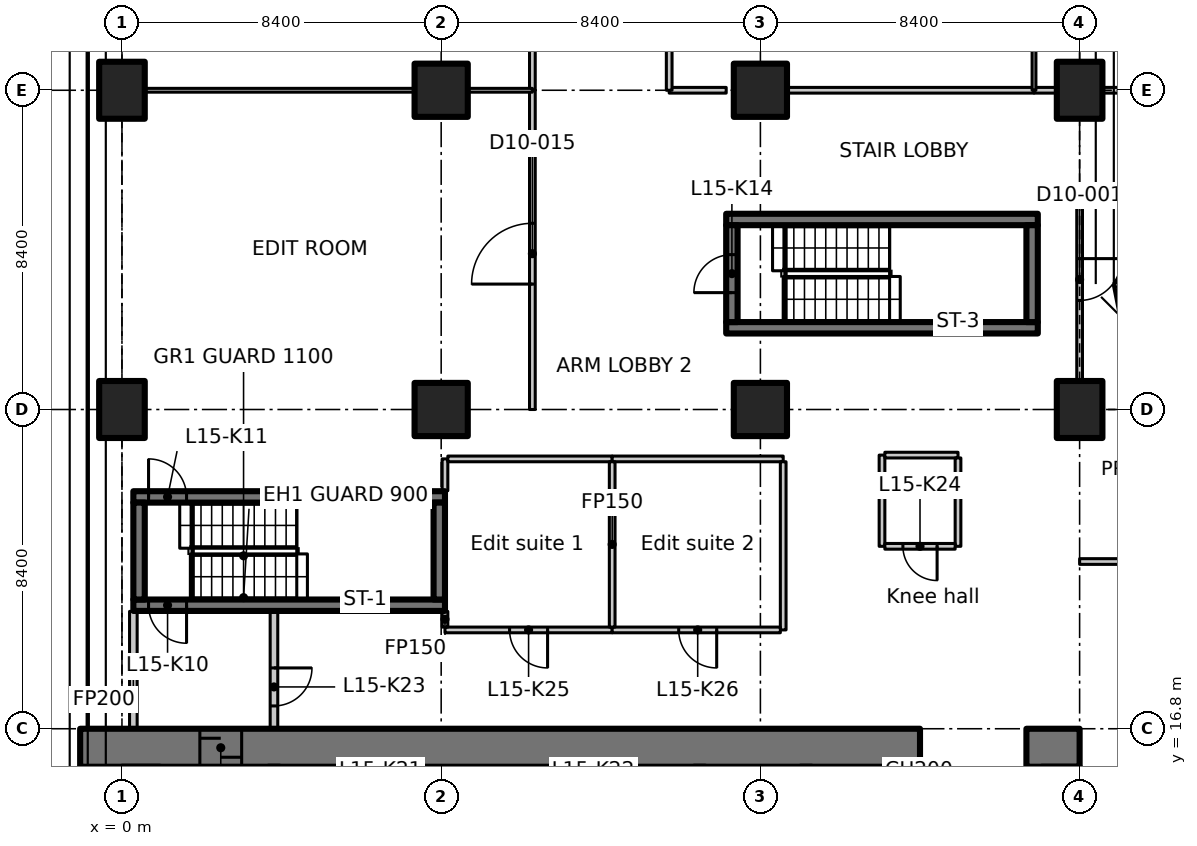
"""IFC4 building model, lengths in metres.
Left out: names, types, materials, properties, quantities, classifications, styles, units other than length and angle.
Written with IfcOpenShell. Run it as: python <this file> out.ifc"""

import sys

from ifc_helpers import new_model, si_unit, direction, frame, frame_2d, origin, origin_2d, place, context, subcontext, project, spatial, polyline, rectangle, outline, extrude, element, fill, save


model = new_model("IFC4")
c1 = context("Model", 3, precision=1e-05, world=origin(), true_north=direction((0.0, 1.0)))
c2 = subcontext(c1, "Body", "Model", "MODEL_VIEW")
j1 = project(units=[si_unit("LENGTHUNIT", "METRE"), si_unit("PLANEANGLEUNIT", "RADIAN")], contexts=[c1])
p1 = place(None, origin())
s1 = spatial("IfcSite", under=j1, at=p1, CompositionType="ELEMENT")
p2 = place(p1, origin())
s2 = spatial("IfcBuilding", under=s1, at=p2, CompositionType="ELEMENT")
p3 = place(p2, frame((0.0, 0.0, 68.9)))
s3 = spatial("IfcBuildingStorey", under=s2, at=p3, CompositionType="ELEMENT", Elevation=68.9)
for number, where, z_axis, x_axis in (
    (1, (0.0, 25.2, 0.0), (0.0, 0.0, 1.0), (1.0, 0.0, 0.0)),
    (2, (0.0, 33.6, 0.0), (0.0, 0.0, 1.0), (1.0, 0.0, 0.0)),
):
    element("IfcColumn", number, at=place(p3, frame(where, z_axis=z_axis, x_axis=x_axis)), inside=s3, PredefinedType="COLUMN", context=c2, shape_type="SweptSolid", body=[
        extrude(rectangle(XDim=1.2, YDim=1.5, at=origin_2d()), origin(), (0.0, 0.0, 1.0), 3.35),
    ])
for number, where, z_axis, x_axis in (
    (3, (8.4, 25.2, 0.0), (0.0, 0.0, 1.0), (1.0, 0.0, 0.0)),
    (4, (8.4, 33.6, 0.0), (0.0, 0.0, 1.0), (1.0, 0.0, 0.0)),
    (5, (16.8, 25.2, 0.0), (0.0, 0.0, 1.0), (1.0, 0.0, 0.0)),
    (6, (16.8, 33.6, 0.0), (0.0, 0.0, 1.0), (1.0, 0.0, 0.0)),
):
    element("IfcColumn", number, at=place(p3, frame(where, z_axis=z_axis, x_axis=x_axis)), inside=s3, PredefinedType="COLUMN", context=c2, shape_type="SweptSolid", body=[
        extrude(rectangle(XDim=1.4, YDim=1.4, at=origin_2d()), origin(), (0.0, 0.0, 1.0), 3.35),
    ])
for number, where, z_axis, x_axis in (
    (7, (25.2, 25.2, 0.0), (0.0, 0.0, 1.0), (1.0, 0.0, 0.0)),
    (8, (25.2, 33.6, 0.0), (0.0, 0.0, 1.0), (1.0, 0.0, 0.0)),
):
    element("IfcColumn", number, at=place(p3, frame(where, z_axis=z_axis, x_axis=x_axis)), inside=s3, PredefinedType="COLUMN", context=c2, shape_type="SweptSolid", body=[
        extrude(rectangle(XDim=1.2, YDim=1.5, at=origin_2d()), origin(), (0.0, 0.0, 1.0), 3.35),
    ])
p4 = place(p3, frame((-1.1, 16.3, 0.0), z_axis=(0.0, 0.0, 1.0), x_axis=(1.0, 0.0, 0.0)))
e9 = element("IfcWall", 9, at=p4, inside=s3, PredefinedType="SHEAR", context=c2, shape_type="SweptSolid", body=[
    extrude(rectangle(XDim=22.1, YDim=1.0, at=frame_2d((11.05, 0.0))), origin(), (0.0, 0.0, 1.0), 3.35),
])
p5 = place(p4, frame((3.15, 0.0, 0.0)))
e10 = element("IfcOpeningElement", 10, at=p5, cuts=e9, PredefinedType="OPENING", context=c2, shape_type="SweptSolid", body=[
    extrude(rectangle(XDim=1.1, YDim=2.3, at=frame_2d((0.55, 1.15))), frame((0.0, 0.51, 0.0), z_axis=(0.0, -1.0, 0.0), x_axis=(1.0, 0.0, 0.0)), (0.0, 0.0, 1.0), 1.02),
])
p6 = place(p3, frame((23.8, 16.3, 0.0), z_axis=(0.0, 0.0, 1.0), x_axis=(1.0, 0.0, 0.0)))
e11 = element("IfcWall", 11, at=p6, inside=s3, PredefinedType="SHEAR", context=c2, shape_type="SweptSolid", body=[
    extrude(rectangle(XDim=1.4, YDim=1.0, at=frame_2d((0.7, 0.0))), origin(), (0.0, 0.0, 1.0), 3.35),
])
p7 = place(p3, frame((24.7, 12.6, 0.0), z_axis=(0.0, 0.0, 1.0), x_axis=(0.0, 1.0, 0.0)))
e12 = element("IfcWall", 12, at=p7, inside=s3, PredefinedType="SHEAR", context=c2, shape_type="SweptSolid", body=[
    extrude(rectangle(XDim=3.2, YDim=1.0, at=frame_2d((1.6, 0.0))), origin(), (0.0, 0.0, 1.0), 3.35),
])
p8 = place(p3, frame((8.5, 20.05, 0.0), z_axis=(0.0, 0.0, 1.0), x_axis=(-1.0, 0.0, 0.0)))
e13 = element("IfcWall", 13, at=p8, inside=s3, PredefinedType="SHEAR", context=c2, shape_type="SweptSolid", body=[
    extrude(rectangle(XDim=8.2, YDim=0.3, at=frame_2d((4.1, 0.0))), origin(), (0.0, 0.0, 1.0), 3.35),
])
p9 = place(p8, frame((6.8, 0.0, 0.0)))
e14 = element("IfcOpeningElement", 14, at=p9, cuts=e13, PredefinedType="OPENING", context=c2, shape_type="SweptSolid", body=[
    extrude(rectangle(XDim=1.0, YDim=2.1, at=frame_2d((0.5, 1.05))), frame((0.0, 0.16, 0.0), z_axis=(0.0, -1.0, 0.0), x_axis=(1.0, 0.0, 0.0)), (0.0, 0.0, 1.0), 0.32),
])
p10 = place(p3, frame((0.3, 22.9, 0.0), z_axis=(0.0, 0.0, 1.0), x_axis=(1.0, 0.0, 0.0)))
e15 = element("IfcWall", 15, at=p10, inside=s3, PredefinedType="SHEAR", context=c2, shape_type="SweptSolid", body=[
    extrude(rectangle(XDim=8.2, YDim=0.3, at=frame_2d((4.1, 0.0))), origin(), (0.0, 0.0, 1.0), 3.35),
])
p11 = place(p10, frame((0.4, 0.0, 0.0)))
e16 = element("IfcOpeningElement", 16, at=p11, cuts=e15, PredefinedType="OPENING", context=c2, shape_type="SweptSolid", body=[
    extrude(rectangle(XDim=1.0, YDim=2.1, at=frame_2d((0.5, 1.05))), frame((0.0, 0.16, 0.0), z_axis=(0.0, -1.0, 0.0), x_axis=(1.0, 0.0, 0.0)), (0.0, 0.0, 1.0), 0.32),
])
for number, where, z_axis, x_axis in (
    (17, (0.45, 20.2, 0.0), (0.0, 0.0, 1.0), (0.0, 1.0, 0.0)),
    (18, (8.35, 20.2, 0.0), (0.0, 0.0, 1.0), (0.0, 1.0, 0.0)),
):
    element("IfcWall", number, at=place(p3, frame(where, z_axis=z_axis, x_axis=x_axis)), inside=s3, PredefinedType="SHEAR", context=c2, shape_type="SweptSolid", body=[
        extrude(rectangle(XDim=2.55, YDim=0.3, at=frame_2d((1.275, 0.0))), origin(), (0.0, 0.0, 1.0), 3.35),
    ])
for number, where, z_axis, x_axis in (
    (19, (15.9, 27.35, 0.0), (0.0, 0.0, 1.0), (1.0, 0.0, 0.0)),
    (20, (15.9, 30.2, 0.0), (0.0, 0.0, 1.0), (1.0, 0.0, 0.0)),
):
    element("IfcWall", number, at=place(p3, frame(where, z_axis=z_axis, x_axis=x_axis)), inside=s3, PredefinedType="SHEAR", context=c2, shape_type="SweptSolid", body=[
        extrude(rectangle(XDim=8.2, YDim=0.3, at=frame_2d((4.1, 0.0))), origin(), (0.0, 0.0, 1.0), 3.35),
    ])
p12 = place(p3, frame((16.05, 27.5, 0.0), z_axis=(0.0, 0.0, 1.0), x_axis=(0.0, 1.0, 0.0)))
e21 = element("IfcWall", 21, at=p12, inside=s3, PredefinedType="SHEAR", context=c2, shape_type="SweptSolid", body=[
    extrude(rectangle(XDim=2.55, YDim=0.3, at=frame_2d((1.275, 0.0))), origin(), (0.0, 0.0, 1.0), 3.35),
])
p13 = place(p12, frame((0.775, 0.0, 0.0)))
e22 = element("IfcOpeningElement", 22, at=p13, cuts=e21, PredefinedType="OPENING", context=c2, shape_type="SweptSolid", body=[
    extrude(rectangle(XDim=1.0, YDim=2.1, at=frame_2d((0.5, 1.05))), frame((0.0, 0.16, 0.0), z_axis=(0.0, -1.0, 0.0), x_axis=(1.0, 0.0, 0.0)), (0.0, 0.0, 1.0), 0.32),
])
p14 = place(p3, frame((23.95, 27.5, 0.0), z_axis=(0.0, 0.0, 1.0), x_axis=(0.0, 1.0, 0.0)))
e23 = element("IfcWall", 23, at=p14, inside=s3, PredefinedType="SHEAR", context=c2, shape_type="SweptSolid", body=[
    extrude(rectangle(XDim=2.55, YDim=0.3, at=frame_2d((1.275, 0.0))), origin(), (0.0, 0.0, 1.0), 3.35),
])
p15 = place(p3, frame((0.3, 16.812, 0.0), z_axis=(0.0, 0.0, 1.0), x_axis=(0.0, 1.0, 0.0)))
e24 = element("IfcWall", 24, at=p15, inside=s3, PredefinedType="PARTITIONING", context=c2, shape_type="SweptSolid", body=[
    extrude(rectangle(XDim=3.076, YDim=0.2, at=frame_2d((1.538, 0.0))), origin(), (0.0, 0.0, 1.0), 2.98),
])
p16 = place(p3, frame((4.0, 19.888, 0.0), z_axis=(0.0, 0.0, 1.0), x_axis=(0.0, -1.0, 0.0)))
e25 = element("IfcWall", 25, at=p16, inside=s3, PredefinedType="PARTITIONING", context=c2, shape_type="SweptSolid", body=[
    extrude(rectangle(XDim=3.076, YDim=0.2, at=frame_2d((1.538, 0.0))), origin(), (0.0, 0.0, 1.0), 3.35),
])
p17 = place(p16, frame((1.488, 0.0, 0.0)))
e26 = element("IfcOpeningElement", 26, at=p17, cuts=e25, PredefinedType="OPENING", context=c2, shape_type="SweptSolid", body=[
    extrude(rectangle(XDim=1.0, YDim=2.1, at=frame_2d((0.5, 1.05))), frame((0.0, 0.11, 0.0), z_axis=(0.0, -1.0, 0.0), x_axis=(1.0, 0.0, 0.0)), (0.0, 0.0, 1.0), 0.22),
])
p18 = place(p3, frame((12.9, 19.4, 0.0), z_axis=(0.0, 0.0, 1.0), x_axis=(-1.0, 0.0, 0.0)))
e27 = element("IfcWall", 27, at=p18, inside=s3, PredefinedType="PARTITIONING", context=c2, shape_type="SweptSolid", body=[
    extrude(rectangle(XDim=4.4, YDim=0.15, at=frame_2d((2.2, 0.0))), origin(), (0.0, 0.0, 1.0), 3.35),
])
p19 = place(p18, frame((1.7, 0.0, 0.0)))
e28 = element("IfcOpeningElement", 28, at=p19, cuts=e27, PredefinedType="OPENING", context=c2, shape_type="SweptSolid", body=[
    extrude(rectangle(XDim=1.0, YDim=2.1, at=frame_2d((0.5, 1.05))), frame((0.0, 0.085, 0.0), z_axis=(0.0, -1.0, 0.0), x_axis=(1.0, 0.0, 0.0)), (0.0, 0.0, 1.0), 0.17),
])
p20 = place(p3, frame((8.5, 19.475, 0.0), z_axis=(0.0, 0.0, 1.0), x_axis=(0.0, 1.0, 0.0)))
e29 = element("IfcWall", 29, at=p20, inside=s3, PredefinedType="PARTITIONING", context=c2, shape_type="SweptSolid", body=[
    extrude(rectangle(XDim=0.413, YDim=0.15, at=frame_2d((0.207, 0.0))), origin(), (0.0, 0.0, 1.0), 3.35),
])
p21 = place(p3, frame((8.5, 23.062, 0.0), z_axis=(0.0, 0.0, 1.0), x_axis=(0.0, 1.0, 0.0)))
e30 = element("IfcWall", 30, at=p21, inside=s3, PredefinedType="PARTITIONING", context=c2, shape_type="SweptSolid", body=[
    extrude(rectangle(XDim=0.838, YDim=0.15, at=frame_2d((0.419, 0.0))), origin(), (0.0, 0.0, 1.0), 3.35),
])
p22 = place(p3, frame((8.575, 23.9, 0.0), z_axis=(0.0, 0.0, 1.0), x_axis=(1.0, 0.0, 0.0)))
e31 = element("IfcWall", 31, at=p22, inside=s3, PredefinedType="PARTITIONING", context=c2, shape_type="SweptSolid", body=[
    extrude(rectangle(XDim=4.325, YDim=0.15, at=frame_2d((2.163, 0.0))), origin(), (0.0, 0.0, 1.0), 3.35),
])
p23 = place(p3, frame((12.9, 23.9, 0.0), z_axis=(0.0, 0.0, 1.0), x_axis=(1.0, 0.0, 0.0)))
e32 = element("IfcWall", 32, at=p23, inside=s3, PredefinedType="PARTITIONING", context=c2, shape_type="SweptSolid", body=[
    extrude(rectangle(XDim=4.5, YDim=0.15, at=frame_2d((2.25, 0.0))), origin(), (0.0, 0.0, 1.0), 3.35),
])
p24 = place(p3, frame((17.4, 23.825, 0.0), z_axis=(0.0, 0.0, 1.0), x_axis=(0.0, -1.0, 0.0)))
e33 = element("IfcWall", 33, at=p24, inside=s3, PredefinedType="PARTITIONING", context=c2, shape_type="SweptSolid", body=[
    extrude(rectangle(XDim=4.425, YDim=0.15, at=frame_2d((2.212, 0.0))), origin(), (0.0, 0.0, 1.0), 3.35),
])
p25 = place(p3, frame((17.325, 19.4, 0.0), z_axis=(0.0, 0.0, 1.0), x_axis=(-1.0, 0.0, 0.0)))
e34 = element("IfcWall", 34, at=p25, inside=s3, PredefinedType="PARTITIONING", context=c2, shape_type="SweptSolid", body=[
    extrude(rectangle(XDim=4.425, YDim=0.15, at=frame_2d((2.212, 0.0))), origin(), (0.0, 0.0, 1.0), 3.35),
])
p26 = place(p25, frame((1.675, 0.0, 0.0)))
e35 = element("IfcOpeningElement", 35, at=p26, cuts=e34, PredefinedType="OPENING", context=c2, shape_type="SweptSolid", body=[
    extrude(rectangle(XDim=1.0, YDim=2.1, at=frame_2d((0.5, 1.05))), frame((0.0, 0.085, 0.0), z_axis=(0.0, -1.0, 0.0), x_axis=(1.0, 0.0, 0.0)), (0.0, 0.0, 1.0), 0.17),
])
p27 = place(p3, frame((12.9, 23.825, 0.0), z_axis=(0.0, 0.0, 1.0), x_axis=(0.0, -1.0, 0.0)))
e36 = element("IfcWall", 36, at=p27, inside=s3, PredefinedType="PARTITIONING", context=c2, shape_type="SweptSolid", body=[
    extrude(rectangle(XDim=4.35, YDim=0.15, at=frame_2d((2.175, 0.0))), origin(), (0.0, 0.0, 1.0), 3.35),
])
p28 = place(p3, frame((20.0, 21.6, 0.0), z_axis=(0.0, 0.0, 1.0), x_axis=(0.0, 1.0, 0.0)))
e37 = element("IfcWall", 37, at=p28, inside=s3, PredefinedType="PARTITIONING", context=c2, shape_type="SweptSolid", body=[
    extrude(rectangle(XDim=2.4, YDim=0.15, at=frame_2d((1.2, 0.0))), origin(), (0.0, 0.0, 1.0), 3.35),
])
p29 = place(p3, frame((20.075, 24.0, 0.0), z_axis=(0.0, 0.0, 1.0), x_axis=(1.0, 0.0, 0.0)))
e38 = element("IfcWall", 38, at=p29, inside=s3, PredefinedType="PARTITIONING", context=c2, shape_type="SweptSolid", body=[
    extrude(rectangle(XDim=1.925, YDim=0.15, at=frame_2d((0.962, 0.0))), origin(), (0.0, 0.0, 1.0), 3.35),
])
p30 = place(p3, frame((22.0, 23.925, 0.0), z_axis=(0.0, 0.0, 1.0), x_axis=(0.0, -1.0, 0.0)))
e39 = element("IfcWall", 39, at=p30, inside=s3, PredefinedType="PARTITIONING", context=c2, shape_type="SweptSolid", body=[
    extrude(rectangle(XDim=2.325, YDim=0.15, at=frame_2d((1.163, 0.0))), origin(), (0.0, 0.0, 1.0), 3.35),
])
p31 = place(p3, frame((21.925, 21.6, 0.0), z_axis=(0.0, 0.0, 1.0), x_axis=(-1.0, 0.0, 0.0)))
e40 = element("IfcWall", 40, at=p31, inside=s3, PredefinedType="PARTITIONING", context=c2, shape_type="SweptSolid", body=[
    extrude(rectangle(XDim=1.85, YDim=0.15, at=frame_2d((0.925, 0.0))), origin(), (0.0, 0.0, 1.0), 3.35),
])
p32 = place(p31, frame((0.475, 0.0, 0.0)))
e41 = element("IfcOpeningElement", 41, at=p32, cuts=e40, PredefinedType="OPENING", context=c2, shape_type="SweptSolid", body=[
    extrude(rectangle(XDim=0.9, YDim=2.1, at=frame_2d((0.45, 1.05))), frame((0.0, 0.085, 0.0), z_axis=(0.0, -1.0, 0.0), x_axis=(1.0, 0.0, 0.0)), (0.0, 0.0, 1.0), 0.17),
])
p33 = place(p3, frame((25.2, 21.2, 0.0), z_axis=(0.0, 0.0, 1.0), x_axis=(1.0, 0.0, 0.0)))
e42 = element("IfcWall", 42, at=p33, inside=s3, PredefinedType="PARTITIONING", context=c2, shape_type="SweptSolid", body=[
    extrude(rectangle(XDim=4.2, YDim=0.15, at=frame_2d((2.1, 0.0))), origin(), (0.0, 0.0, 1.0), 3.33),
])
p34 = place(p3, frame((25.2, 31.0, 0.0), z_axis=(0.0, 0.0, 1.0), x_axis=(0.0, -1.0, 0.0)))
e43 = element("IfcWall", 43, at=p34, inside=s3, PredefinedType="PARTITIONING", context=c2, shape_type="SweptSolid", body=[
    extrude(outline(polyline([(0.0, 0.0), (5.03, 0.0), (5.03, 2.98), (0.0, 2.98), (0.0, 0.0)])), frame((0.0, 0.075, 0.0), z_axis=(0.0, -1.0, 0.0), x_axis=(1.0, 0.0, 0.0)), (0.0, 0.0, 1.0), 0.15),
])
p35 = place(p34, frame((1.83, 0.0, 0.0)))
e44 = element("IfcOpeningElement", 44, at=p35, cuts=e43, PredefinedType="OPENING", context=c2, shape_type="SweptSolid", body=[
    extrude(rectangle(XDim=1.1, YDim=2.1, at=frame_2d((0.55, 1.05))), frame((0.0, 0.085, 0.0), z_axis=(0.0, -1.0, 0.0), x_axis=(1.0, 0.0, 0.0)), (0.0, 0.0, 1.0), 0.17),
])
p36 = place(p3, frame((25.2, 31.0, 0.0), z_axis=(0.0, 0.0, 1.0), x_axis=(1.0, 0.0, 0.0)))
e45 = element("IfcWall", 45, at=p36, inside=s3, PredefinedType="PARTITIONING", context=c2, shape_type="SweptSolid", body=[
    extrude(rectangle(XDim=3.806, YDim=0.15, at=frame_2d((1.903, 0.0))), origin(), (0.0, 0.0, 1.0), 2.98),
])
p37 = place(p3, frame((10.8, 25.2, 0.0), z_axis=(0.0, 0.0, 1.0), x_axis=(0.0, 1.0, 0.0)))
e46 = element("IfcWall", 46, at=p37, inside=s3, PredefinedType="PARTITIONING", context=c2, shape_type="SweptSolid", body=[
    extrude(rectangle(XDim=8.4, YDim=0.15, at=frame_2d((4.2, 0.0))), origin(), (0.0, 0.0, 1.0), 3.33),
])
p38 = place(p37, frame((3.3, 0.0, 0.0)))
e47 = element("IfcOpeningElement", 47, at=p38, cuts=e46, PredefinedType="OPENING", context=c2, shape_type="SweptSolid", body=[
    extrude(rectangle(XDim=1.6, YDim=2.1, at=frame_2d((0.8, 1.05))), frame((0.0, 0.085, 0.0), z_axis=(0.0, -1.0, 0.0), x_axis=(1.0, 0.0, 0.0)), (0.0, 0.0, 1.0), 0.17),
])
p39 = place(p3, frame((14.4, 33.6, 0.0), z_axis=(0.0, 0.0, 1.0), x_axis=(1.0, 0.0, 0.0)))
e48 = element("IfcWall", 48, at=p39, inside=s3, PredefinedType="PARTITIONING", context=c2, shape_type="SweptSolid", body=[
    extrude(rectangle(XDim=1.5, YDim=0.15, at=frame_2d((0.75, 0.0))), origin(), (0.0, 0.0, 1.0), 3.33),
])
p40 = place(p3, frame((17.52, 33.6, 0.0), z_axis=(0.0, 0.0, 1.0), x_axis=(1.0, 0.0, 0.0)))
e49 = element("IfcWall", 49, at=p40, inside=s3, PredefinedType="PARTITIONING", context=c2, shape_type="SweptSolid", body=[
    extrude(rectangle(XDim=6.48, YDim=0.15, at=frame_2d((3.24, 0.0))), origin(), (0.0, 0.0, 1.0), 3.33),
])
p41 = place(p3, frame((24.0, 33.6, 0.0), z_axis=(0.0, 0.0, 1.0), x_axis=(1.0, 0.0, 0.0)))
e50 = element("IfcWall", 50, at=p41, inside=s3, PredefinedType="PARTITIONING", context=c2, shape_type="SweptSolid", body=[
    extrude(rectangle(XDim=0.58, YDim=0.15, at=frame_2d((0.29, 0.0))), origin(), (0.0, 0.0, 1.0), 3.33),
])
p42 = place(p3, frame((25.82, 33.6, 0.0), z_axis=(0.0, 0.0, 1.0), x_axis=(1.0, 0.0, 0.0)))
e51 = element("IfcWall", 51, at=p42, inside=s3, PredefinedType="PARTITIONING", context=c2, shape_type="SweptSolid", body=[
    extrude(rectangle(XDim=4.168, YDim=0.15, at=frame_2d((2.084, 0.0))), origin(), (0.0, 0.0, 1.0), 2.98),
])
p43 = place(p3, frame((10.8, 33.6, 0.0), z_axis=(0.0, 0.0, 1.0), x_axis=(0.0, 1.0, 0.0)))
e52 = element("IfcWall", 52, at=p43, inside=s3, PredefinedType="PARTITIONING", context=c2, shape_type="SweptSolid", body=[
    extrude(rectangle(XDim=8.4, YDim=0.15, at=frame_2d((4.2, 0.0))), origin(), (0.0, 0.0, 1.0), 3.33),
])
p44 = place(p43, frame((3.3, 0.0, 0.0)))
e53 = element("IfcOpeningElement", 53, at=p44, cuts=e52, PredefinedType="OPENING", context=c2, shape_type="SweptSolid", body=[
    extrude(rectangle(XDim=1.6, YDim=2.1, at=frame_2d((0.8, 1.05))), frame((0.0, 0.085, 0.0), z_axis=(0.0, -1.0, 0.0), x_axis=(1.0, 0.0, 0.0)), (0.0, 0.0, 1.0), 0.17),
])
p45 = place(p3, frame((14.4, 37.8, 0.0), z_axis=(0.0, 0.0, 1.0), x_axis=(0.0, -1.0, 0.0)))
e54 = element("IfcWall", 54, at=p45, inside=s3, PredefinedType="PARTITIONING", context=c2, shape_type="SweptSolid", body=[
    extrude(rectangle(XDim=4.2, YDim=0.15, at=frame_2d((2.1, 0.0))), origin(), (0.0, 0.0, 1.0), 3.33),
])
p46 = place(p3, frame((0.62, 33.6, 0.0), z_axis=(0.0, 0.0, 1.0), x_axis=(1.0, 0.0, 0.0)))
e55 = element("IfcWall", 55, at=p46, inside=s3, PredefinedType="PARTITIONING", context=c2, shape_type="SweptSolid", body=[
    extrude(rectangle(XDim=7.06, YDim=0.1, at=frame_2d((3.53, 0.0))), origin(), (0.0, 0.0, 1.0), 3.33),
])
p47 = place(p3, frame((9.12, 33.6, 0.0), z_axis=(0.0, 0.0, 1.0), x_axis=(1.0, 0.0, 0.0)))
e56 = element("IfcWall", 56, at=p47, inside=s3, PredefinedType="PARTITIONING", context=c2, shape_type="SweptSolid", body=[
    extrude(rectangle(XDim=1.68, YDim=0.1, at=frame_2d((0.84, 0.0))), origin(), (0.0, 0.0, 1.0), 3.33),
])
p48 = place(p3, frame((24.0, 37.8, 0.0), z_axis=(0.0, 0.0, 1.0), x_axis=(0.0, -1.0, 0.0)))
e57 = element("IfcWall", 57, at=p48, inside=s3, PredefinedType="PARTITIONING", context=c2, shape_type="SweptSolid", body=[
    extrude(rectangle(XDim=4.2, YDim=0.1, at=frame_2d((2.1, 0.0))), origin(), (0.0, 0.0, 1.0), 3.33),
])
p49 = place(p5, origin())
e58 = element("IfcDoor", 58, at=p49, inside=s3, OperationType="SLIDING_TO_LEFT", PredefinedType="DOOR", context=c2, shape_type="SweptSolid", body=[
    extrude(rectangle(XDim=1.1, YDim=2.3, at=frame_2d((0.55, 1.15))), frame((0.0, 0.025, 0.0), z_axis=(0.0, -1.0, 0.0), x_axis=(1.0, 0.0, 0.0)), (0.0, 0.0, 1.0), 0.05),
])
fill(e10, e58)
p50 = place(p9, origin())
e59 = element("IfcDoor", 59, at=p50, inside=s3, OperationType="SINGLE_SWING_RIGHT", PredefinedType="DOOR", context=c2, shape_type="SweptSolid", body=[
    extrude(rectangle(XDim=1.0, YDim=2.1, at=frame_2d((0.5, 1.05))), frame((0.0, 0.025, 0.0), z_axis=(0.0, -1.0, 0.0), x_axis=(1.0, 0.0, 0.0)), (0.0, 0.0, 1.0), 0.05),
])
fill(e14, e59)
p51 = place(p11, origin())
e60 = element("IfcDoor", 60, at=p51, inside=s3, OperationType="SINGLE_SWING_LEFT", PredefinedType="DOOR", context=c2, shape_type="SweptSolid", body=[
    extrude(rectangle(XDim=1.0, YDim=2.1, at=frame_2d((0.5, 1.05))), frame((0.0, 0.025, 0.0), z_axis=(0.0, -1.0, 0.0), x_axis=(1.0, 0.0, 0.0)), (0.0, 0.0, 1.0), 0.05),
])
fill(e16, e60)
p52 = place(p13, origin())
e61 = element("IfcDoor", 61, at=p52, inside=s3, OperationType="SINGLE_SWING_RIGHT", PredefinedType="DOOR", context=c2, shape_type="SweptSolid", body=[
    extrude(rectangle(XDim=1.0, YDim=2.1, at=frame_2d((0.5, 1.05))), frame((0.0, 0.025, 0.0), z_axis=(0.0, -1.0, 0.0), x_axis=(1.0, 0.0, 0.0)), (0.0, 0.0, 1.0), 0.05),
])
fill(e22, e61)
p53 = place(p17, origin())
e62 = element("IfcDoor", 62, at=p53, inside=s3, OperationType="SINGLE_SWING_LEFT", PredefinedType="DOOR", context=c2, shape_type="SweptSolid", body=[
    extrude(rectangle(XDim=1.0, YDim=2.1, at=frame_2d((0.5, 1.05))), frame((0.0, 0.025, 0.0), z_axis=(0.0, -1.0, 0.0), x_axis=(1.0, 0.0, 0.0)), (0.0, 0.0, 1.0), 0.05),
])
fill(e26, e62)
p54 = place(p32, origin())
e63 = element("IfcDoor", 63, at=p54, inside=s3, OperationType="SINGLE_SWING_RIGHT", PredefinedType="DOOR", context=c2, shape_type="SweptSolid", body=[
    extrude(rectangle(XDim=0.9, YDim=2.1, at=frame_2d((0.45, 1.05))), frame((0.0, 0.025, 0.0), z_axis=(0.0, -1.0, 0.0), x_axis=(1.0, 0.0, 0.0)), (0.0, 0.0, 1.0), 0.05),
])
fill(e41, e63)
p55 = place(p19, origin())
e64 = element("IfcDoor", 64, at=p55, inside=s3, OperationType="SINGLE_SWING_LEFT", PredefinedType="DOOR", context=c2, shape_type="SweptSolid", body=[
    extrude(rectangle(XDim=1.0, YDim=2.1, at=frame_2d((0.5, 1.05))), frame((0.0, 0.025, 0.0), z_axis=(0.0, -1.0, 0.0), x_axis=(1.0, 0.0, 0.0)), (0.0, 0.0, 1.0), 0.05),
])
fill(e28, e64)
p56 = place(p26, origin())
e65 = element("IfcDoor", 65, at=p56, inside=s3, OperationType="SINGLE_SWING_RIGHT", PredefinedType="DOOR", context=c2, shape_type="SweptSolid", body=[
    extrude(rectangle(XDim=1.0, YDim=2.1, at=frame_2d((0.5, 1.05))), frame((0.0, 0.025, 0.0), z_axis=(0.0, -1.0, 0.0), x_axis=(1.0, 0.0, 0.0)), (0.0, 0.0, 1.0), 0.05),
])
fill(e35, e65)
p57 = place(p35, origin())
e66 = element("IfcDoor", 66, at=p57, inside=s3, OperationType="SINGLE_SWING_RIGHT", PredefinedType="DOOR", context=c2, shape_type="SweptSolid", body=[
    extrude(rectangle(XDim=1.1, YDim=2.1, at=frame_2d((0.55, 1.05))), frame((0.0, 0.025, 0.0), z_axis=(0.0, -1.0, 0.0), x_axis=(1.0, 0.0, 0.0)), (0.0, 0.0, 1.0), 0.05),
])
fill(e44, e66)
p58 = place(p38, origin())
e67 = element("IfcDoor", 67, at=p58, inside=s3, OperationType="DOUBLE_DOOR_SINGLE_SWING", PredefinedType="DOOR", context=c2, shape_type="SweptSolid", body=[
    extrude(rectangle(XDim=1.6, YDim=2.1, at=frame_2d((0.8, 1.05))), frame((0.0, 0.025, 0.0), z_axis=(0.0, -1.0, 0.0), x_axis=(1.0, 0.0, 0.0)), (0.0, 0.0, 1.0), 0.05),
])
fill(e47, e67)
save(model, sys.argv[1])
